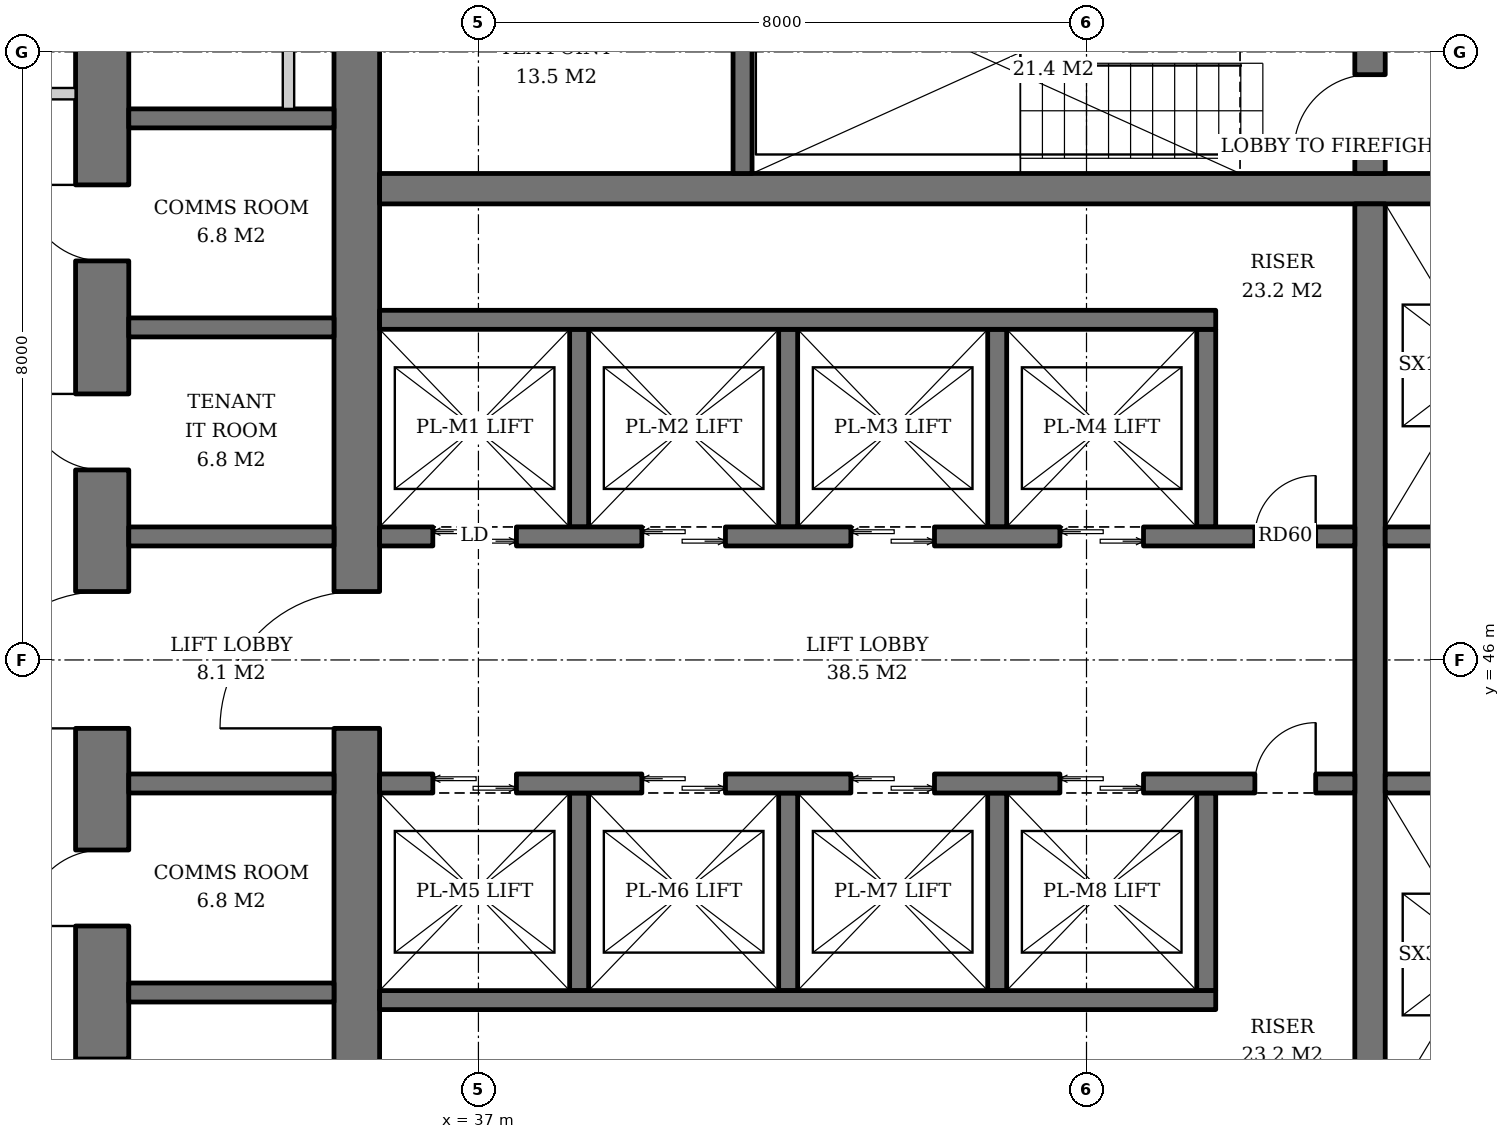
"""IFC4 building model, lengths in metres.
Left out: names, types, materials, properties, quantities, classifications, styles, units other than length and angle.
Written with IfcOpenShell. Run it as: python <this file> out.ifc"""

import sys

from ifc_helpers import new_model, si_unit, direction, frame, frame_2d, origin, place, context, subcontext, project, spatial, rectangle, extrude, element, fill, save


model = new_model("IFC4")
c1 = context("Model", 3, precision=1e-05, world=origin(), true_north=direction((0.0, 1.0)))
c2 = subcontext(c1, "Body", "Model", "MODEL_VIEW")
j1 = project(units=[si_unit("LENGTHUNIT", "METRE"), si_unit("PLANEANGLEUNIT", "RADIAN")], contexts=[c1])
p1 = place(None, origin())
s1 = spatial("IfcSite", under=j1, at=p1, CompositionType="ELEMENT")
p2 = place(p1, origin())
s2 = spatial("IfcBuilding", under=s1, at=p2, CompositionType="ELEMENT")
p3 = place(p2, frame((0.0, 0.0, 146.4)))
s3 = spatial("IfcBuildingStorey", under=s2, at=p3, CompositionType="ELEMENT", Elevation=146.4)
p4 = place(p3, frame((35.4, 36.7, 0.0), z_axis=(0.0, 0.0, 1.0), x_axis=(0.0, 1.0, 0.0)))
e1 = element("IfcWall", 1, at=p4, inside=s3, PredefinedType="SHEAR", context=c2, shape_type="SweptSolid", body=[
    extrude(rectangle(XDim=18.6, YDim=0.6, at=frame_2d((9.3, 0.0))), origin(), (0.0, 0.0, 1.0), 3.8),
])
p5 = place(p4, frame((8.4, 0.0, 0.0)))
e2 = element("IfcOpeningElement", 2, at=p5, cuts=e1, PredefinedType="OPENING", context=c2, shape_type="SweptSolid", body=[
    extrude(rectangle(XDim=1.8, YDim=2.4, at=frame_2d((0.9, 1.2))), frame((0.0, 0.31, 0.0), z_axis=(0.0, -1.0, 0.0), x_axis=(1.0, 0.0, 0.0)), (0.0, 0.0, 1.0), 0.62),
])
p6 = place(p3, frame((32.05, 33.4, 0.0), z_axis=(0.0, 0.0, 1.0), x_axis=(0.0, 1.0, 0.0)))
e3 = element("IfcWall", 3, at=p6, inside=s3, PredefinedType="SHEAR", context=c2, shape_type="SweptSolid", body=[
    extrude(rectangle(XDim=25.2, YDim=0.7, at=frame_2d((12.6, 0.0))), origin(), (0.0, 0.0, 1.0), 3.8),
])
p7 = place(p6, frame((11.7, 0.0, 0.0)))
e4 = element("IfcOpeningElement", 4, at=p7, cuts=e3, PredefinedType="OPENING", context=c2, shape_type="SweptSolid", body=[
    extrude(rectangle(XDim=1.8, YDim=2.4, at=frame_2d((0.9, 1.2))), frame((0.0, 0.36, 0.0), z_axis=(0.0, -1.0, 0.0), x_axis=(1.0, 0.0, 0.0)), (0.0, 0.0, 1.0), 0.72),
])
p8 = place(p6, frame((3.6, 0.0, 0.0)))
e5 = element("IfcOpeningElement", 5, at=p8, cuts=e3, PredefinedType="OPENING", context=c2, shape_type="SweptSolid", body=[
    extrude(rectangle(XDim=1.0, YDim=2.1, at=frame_2d((0.5, 1.05))), frame((0.0, 0.36, 0.0), z_axis=(0.0, -1.0, 0.0), x_axis=(1.0, 0.0, 0.0)), (0.0, 0.0, 1.0), 0.72),
])
p9 = place(p6, frame((6.35, 0.0, 0.0)))
e6 = element("IfcOpeningElement", 6, at=p9, cuts=e3, PredefinedType="OPENING", context=c2, shape_type="SweptSolid", body=[
    extrude(rectangle(XDim=1.0, YDim=2.1, at=frame_2d((0.5, 1.05))), frame((0.0, 0.36, 0.0), z_axis=(0.0, -1.0, 0.0), x_axis=(1.0, 0.0, 0.0)), (0.0, 0.0, 1.0), 0.72),
])
p10 = place(p6, frame((9.1, 0.0, 0.0)))
e7 = element("IfcOpeningElement", 7, at=p10, cuts=e3, PredefinedType="OPENING", context=c2, shape_type="SweptSolid", body=[
    extrude(rectangle(XDim=1.0, YDim=2.1, at=frame_2d((0.5, 1.05))), frame((0.0, 0.36, 0.0), z_axis=(0.0, -1.0, 0.0), x_axis=(1.0, 0.0, 0.0)), (0.0, 0.0, 1.0), 0.72),
])
p11 = place(p6, frame((15.1, 0.0, 0.0)))
e8 = element("IfcOpeningElement", 8, at=p11, cuts=e3, PredefinedType="OPENING", context=c2, shape_type="SweptSolid", body=[
    extrude(rectangle(XDim=1.0, YDim=2.1, at=frame_2d((0.5, 1.05))), frame((0.0, 0.36, 0.0), z_axis=(0.0, -1.0, 0.0), x_axis=(1.0, 0.0, 0.0)), (0.0, 0.0, 1.0), 0.72),
])
p12 = place(p6, frame((17.85, 0.0, 0.0)))
e9 = element("IfcOpeningElement", 9, at=p12, cuts=e3, PredefinedType="OPENING", context=c2, shape_type="SweptSolid", body=[
    extrude(rectangle(XDim=1.0, YDim=2.1, at=frame_2d((0.5, 1.05))), frame((0.0, 0.36, 0.0), z_axis=(0.0, -1.0, 0.0), x_axis=(1.0, 0.0, 0.0)), (0.0, 0.0, 1.0), 0.72),
])
p13 = place(p3, frame((35.7, 52.2, 0.0), z_axis=(0.0, 0.0, 1.0), x_axis=(1.0, 0.0, 0.0)))
e10 = element("IfcWall", 10, at=p13, inside=s3, PredefinedType="SHEAR", context=c2, shape_type="SweptSolid", body=[
    extrude(rectangle(XDim=18.6, YDim=0.4, at=frame_2d((9.3, 0.0))), origin(), (0.0, 0.0, 1.0), 3.8),
])
p14 = place(p3, frame((48.73, 40.0, 0.0), z_axis=(0.0, 0.0, 1.0), x_axis=(0.0, 1.0, 0.0)))
e11 = element("IfcWall", 11, at=p14, inside=s3, PredefinedType="SHEAR", context=c2, shape_type="SweptSolid", body=[
    extrude(rectangle(XDim=12.0, YDim=0.4, at=frame_2d((6.0, 0.0))), origin(), (0.0, 0.0, 1.0), 3.8),
])
p15 = place(p3, frame((48.73, 52.4, 0.0), z_axis=(0.0, 0.0, 1.0), x_axis=(0.0, 1.0, 0.0)))
e12 = element("IfcWall", 12, at=p15, inside=s3, PredefinedType="SHEAR", context=c2, shape_type="SweptSolid", body=[
    extrude(rectangle(XDim=2.9, YDim=0.4, at=frame_2d((1.45, 0.0))), origin(), (0.0, 0.0, 1.0), 3.8),
])
p16 = place(p15, frame((0.3, 0.0, 0.0)))
e13 = element("IfcOpeningElement", 13, at=p16, cuts=e12, PredefinedType="OPENING", context=c2, shape_type="SweptSolid", body=[
    extrude(rectangle(XDim=1.0, YDim=2.1, at=frame_2d((0.5, 1.05))), frame((0.0, 0.21, 0.0), z_axis=(0.0, -1.0, 0.0), x_axis=(1.0, 0.0, 0.0)), (0.0, 0.0, 1.0), 0.42),
])
p17 = place(p3, frame((40.475, 52.4, 0.0), z_axis=(0.0, 0.0, 1.0), x_axis=(0.0, 1.0, 0.0)))
e14 = element("IfcWall", 14, at=p17, inside=s3, PredefinedType="SHEAR", context=c2, shape_type="SweptSolid", body=[
    extrude(rectangle(XDim=2.9, YDim=0.25, at=frame_2d((1.45, 0.0))), origin(), (0.0, 0.0, 1.0), 3.8),
])
for number, where, z_axis, x_axis in (
    (15, (38.325, 47.75, 0.0), (0.0, 0.0, 1.0), (0.0, 1.0, 0.0)),
    (16, (41.075, 47.75, 0.0), (0.0, 0.0, 1.0), (0.0, 1.0, 0.0)),
    (17, (43.825, 47.75, 0.0), (0.0, 0.0, 1.0), (0.0, 1.0, 0.0)),
    (18, (46.575, 47.75, 0.0), (0.0, 0.0, 1.0), (0.0, 1.0, 0.0)),
):
    element("IfcWall", number, at=place(p3, frame(where, z_axis=z_axis, x_axis=x_axis)), inside=s3, PredefinedType="SHEAR", context=c2, shape_type="SweptSolid", body=[
        extrude(rectangle(XDim=2.6, YDim=0.25, at=frame_2d((1.3, 0.0))), origin(), (0.0, 0.0, 1.0), 3.8),
    ])
p18 = place(p3, frame((35.7, 50.475, 0.0), z_axis=(0.0, 0.0, 1.0), x_axis=(1.0, 0.0, 0.0)))
e19 = element("IfcWall", 19, at=p18, inside=s3, PredefinedType="SHEAR", context=c2, shape_type="SweptSolid", body=[
    extrude(rectangle(XDim=11.0, YDim=0.25, at=frame_2d((5.5, 0.0))), origin(), (0.0, 0.0, 1.0), 3.8),
])
p19 = place(p3, frame((35.7, 47.625, 0.0), z_axis=(0.0, 0.0, 1.0), x_axis=(1.0, 0.0, 0.0)))
e20 = element("IfcWall", 20, at=p19, inside=s3, PredefinedType="SHEAR", context=c2, shape_type="SweptSolid", body=[
    extrude(rectangle(XDim=12.83, YDim=0.25, at=frame_2d((6.415, 0.0))), origin(), (0.0, 0.0, 1.0), 3.8),
])
p20 = place(p19, frame((0.7, 0.0, 0.0)))
e21 = element("IfcOpeningElement", 21, at=p20, cuts=e20, PredefinedType="OPENING", context=c2, shape_type="SweptSolid", body=[
    extrude(rectangle(XDim=1.1, YDim=2.2, at=frame_2d((0.55, 1.1))), frame((0.0, 0.135, 0.0), z_axis=(0.0, -1.0, 0.0), x_axis=(1.0, 0.0, 0.0)), (0.0, 0.0, 1.0), 0.27),
])
p21 = place(p19, frame((3.45, 0.0, 0.0)))
e22 = element("IfcOpeningElement", 22, at=p21, cuts=e20, PredefinedType="OPENING", context=c2, shape_type="SweptSolid", body=[
    extrude(rectangle(XDim=1.1, YDim=2.2, at=frame_2d((0.55, 1.1))), frame((0.0, 0.135, 0.0), z_axis=(0.0, -1.0, 0.0), x_axis=(1.0, 0.0, 0.0)), (0.0, 0.0, 1.0), 0.27),
])
p22 = place(p19, frame((6.2, 0.0, 0.0)))
e23 = element("IfcOpeningElement", 23, at=p22, cuts=e20, PredefinedType="OPENING", context=c2, shape_type="SweptSolid", body=[
    extrude(rectangle(XDim=1.1, YDim=2.2, at=frame_2d((0.55, 1.1))), frame((0.0, 0.135, 0.0), z_axis=(0.0, -1.0, 0.0), x_axis=(1.0, 0.0, 0.0)), (0.0, 0.0, 1.0), 0.27),
])
p23 = place(p19, frame((8.95, 0.0, 0.0)))
e24 = element("IfcOpeningElement", 24, at=p23, cuts=e20, PredefinedType="OPENING", context=c2, shape_type="SweptSolid", body=[
    extrude(rectangle(XDim=1.1, YDim=2.2, at=frame_2d((0.55, 1.1))), frame((0.0, 0.135, 0.0), z_axis=(0.0, -1.0, 0.0), x_axis=(1.0, 0.0, 0.0)), (0.0, 0.0, 1.0), 0.27),
])
p24 = place(p19, frame((11.515, 0.0, 0.0)))
e25 = element("IfcOpeningElement", 25, at=p24, cuts=e20, PredefinedType="OPENING", context=c2, shape_type="SweptSolid", body=[
    extrude(rectangle(XDim=0.8, YDim=2.0, at=frame_2d((0.4, 1.0))), frame((0.0, 0.135, 0.0), z_axis=(0.0, -1.0, 0.0), x_axis=(1.0, 0.0, 0.0)), (0.0, 0.0, 1.0), 0.27),
])
for number, where, z_axis, x_axis in (
    (26, (38.325, 44.25, 0.0), (0.0, 0.0, 1.0), (0.0, -1.0, 0.0)),
    (27, (41.075, 44.25, 0.0), (0.0, 0.0, 1.0), (0.0, -1.0, 0.0)),
    (28, (43.825, 44.25, 0.0), (0.0, 0.0, 1.0), (0.0, -1.0, 0.0)),
    (29, (46.575, 44.25, 0.0), (0.0, 0.0, 1.0), (0.0, -1.0, 0.0)),
):
    element("IfcWall", number, at=place(p3, frame(where, z_axis=z_axis, x_axis=x_axis)), inside=s3, PredefinedType="SHEAR", context=c2, shape_type="SweptSolid", body=[
        extrude(rectangle(XDim=2.6, YDim=0.25, at=frame_2d((1.3, 0.0))), origin(), (0.0, 0.0, 1.0), 3.8),
    ])
p25 = place(p3, frame((35.7, 41.525, 0.0), z_axis=(0.0, 0.0, 1.0), x_axis=(1.0, 0.0, 0.0)))
e30 = element("IfcWall", 30, at=p25, inside=s3, PredefinedType="SHEAR", context=c2, shape_type="SweptSolid", body=[
    extrude(rectangle(XDim=11.0, YDim=0.25, at=frame_2d((5.5, 0.0))), origin(), (0.0, 0.0, 1.0), 3.8),
])
p26 = place(p3, frame((35.7, 44.375, 0.0), z_axis=(0.0, 0.0, 1.0), x_axis=(1.0, 0.0, 0.0)))
e31 = element("IfcWall", 31, at=p26, inside=s3, PredefinedType="SHEAR", context=c2, shape_type="SweptSolid", body=[
    extrude(rectangle(XDim=12.83, YDim=0.25, at=frame_2d((6.415, 0.0))), origin(), (0.0, 0.0, 1.0), 3.8),
])
p27 = place(p26, frame((0.7, 0.0, 0.0)))
e32 = element("IfcOpeningElement", 32, at=p27, cuts=e31, PredefinedType="OPENING", context=c2, shape_type="SweptSolid", body=[
    extrude(rectangle(XDim=1.1, YDim=2.2, at=frame_2d((0.55, 1.1))), frame((0.0, 0.135, 0.0), z_axis=(0.0, -1.0, 0.0), x_axis=(1.0, 0.0, 0.0)), (0.0, 0.0, 1.0), 0.27),
])
p28 = place(p26, frame((3.45, 0.0, 0.0)))
e33 = element("IfcOpeningElement", 33, at=p28, cuts=e31, PredefinedType="OPENING", context=c2, shape_type="SweptSolid", body=[
    extrude(rectangle(XDim=1.1, YDim=2.2, at=frame_2d((0.55, 1.1))), frame((0.0, 0.135, 0.0), z_axis=(0.0, -1.0, 0.0), x_axis=(1.0, 0.0, 0.0)), (0.0, 0.0, 1.0), 0.27),
])
p29 = place(p26, frame((6.2, 0.0, 0.0)))
e34 = element("IfcOpeningElement", 34, at=p29, cuts=e31, PredefinedType="OPENING", context=c2, shape_type="SweptSolid", body=[
    extrude(rectangle(XDim=1.1, YDim=2.2, at=frame_2d((0.55, 1.1))), frame((0.0, 0.135, 0.0), z_axis=(0.0, -1.0, 0.0), x_axis=(1.0, 0.0, 0.0)), (0.0, 0.0, 1.0), 0.27),
])
p30 = place(p26, frame((8.95, 0.0, 0.0)))
e35 = element("IfcOpeningElement", 35, at=p30, cuts=e31, PredefinedType="OPENING", context=c2, shape_type="SweptSolid", body=[
    extrude(rectangle(XDim=1.1, YDim=2.2, at=frame_2d((0.55, 1.1))), frame((0.0, 0.135, 0.0), z_axis=(0.0, -1.0, 0.0), x_axis=(1.0, 0.0, 0.0)), (0.0, 0.0, 1.0), 0.27),
])
p31 = place(p26, frame((11.515, 0.0, 0.0)))
e36 = element("IfcOpeningElement", 36, at=p31, cuts=e31, PredefinedType="OPENING", context=c2, shape_type="SweptSolid", body=[
    extrude(rectangle(XDim=0.8, YDim=2.0, at=frame_2d((0.4, 1.0))), frame((0.0, 0.135, 0.0), z_axis=(0.0, -1.0, 0.0), x_axis=(1.0, 0.0, 0.0)), (0.0, 0.0, 1.0), 0.27),
])
for number, where, z_axis, x_axis in (
    (37, (48.93, 47.625, 0.0), (0.0, 0.0, 1.0), (1.0, 0.0, 0.0)),
    (38, (48.93, 44.375, 0.0), (0.0, 0.0, 1.0), (1.0, 0.0, 0.0)),
):
    element("IfcWall", number, at=place(p3, frame(where, z_axis=z_axis, x_axis=x_axis)), inside=s3, PredefinedType="SHEAR", context=c2, shape_type="SweptSolid", body=[
        extrude(rectangle(XDim=5.37, YDim=0.25, at=frame_2d((2.685, 0.0))), origin(), (0.0, 0.0, 1.0), 3.8),
    ])
for number, where, z_axis, x_axis in (
    (39, (32.4, 41.625, 0.0), (0.0, 0.0, 1.0), (1.0, 0.0, 0.0)),
    (40, (32.4, 44.375, 0.0), (0.0, 0.0, 1.0), (1.0, 0.0, 0.0)),
    (41, (32.4, 47.625, 0.0), (0.0, 0.0, 1.0), (1.0, 0.0, 0.0)),
    (42, (32.4, 50.375, 0.0), (0.0, 0.0, 1.0), (1.0, 0.0, 0.0)),
    (43, (32.4, 53.125, 0.0), (0.0, 0.0, 1.0), (1.0, 0.0, 0.0)),
):
    element("IfcWall", number, at=place(p3, frame(where, z_axis=z_axis, x_axis=x_axis)), inside=s3, PredefinedType="SHEAR", context=c2, shape_type="SweptSolid", body=[
        extrude(rectangle(XDim=2.7, YDim=0.25, at=frame_2d((1.35, 0.0))), origin(), (0.0, 0.0, 1.0), 3.8),
    ])
p32 = place(p3, frame((34.501, 53.25, 0.0), z_axis=(0.0, 0.0, 1.0), x_axis=(0.0, 1.0, 0.0)))
e44 = element("IfcWall", 44, at=p32, inside=s3, PredefinedType="SOLIDWALL", context=c2, shape_type="SweptSolid", body=[
    extrude(rectangle(XDim=5.35, YDim=0.15, at=frame_2d((2.675, 0.0))), origin(), (0.0, 0.0, 1.0), 3.62),
])
p33 = place(p3, frame((31.7, 53.45, 0.0), z_axis=(0.0, 0.0, 1.0), x_axis=(-1.0, 0.0, 0.0)))
e45 = element("IfcWall", 45, at=p33, inside=s3, PredefinedType="PARTITIONING", context=c2, shape_type="SweptSolid", body=[
    extrude(rectangle(XDim=1.725, YDim=0.15, at=frame_2d((0.862, 0.0))), origin(), (0.0, 0.0, 1.0), 3.62),
])
p34 = place(p20, origin())
e46 = element("IfcDoor", 46, at=p34, inside=s3, OperationType="DOUBLE_DOOR_SLIDING", PredefinedType="DOOR", context=c2, shape_type="SweptSolid", body=[
    extrude(rectangle(XDim=1.1, YDim=2.2, at=frame_2d((0.55, 1.1))), frame((0.0, 0.025, 0.0), z_axis=(0.0, -1.0, 0.0), x_axis=(1.0, 0.0, 0.0)), (0.0, 0.0, 1.0), 0.05),
])
fill(e21, e46)
p35 = place(p21, origin())
e47 = element("IfcDoor", 47, at=p35, inside=s3, OperationType="DOUBLE_DOOR_SLIDING", PredefinedType="DOOR", context=c2, shape_type="SweptSolid", body=[
    extrude(rectangle(XDim=1.1, YDim=2.2, at=frame_2d((0.55, 1.1))), frame((0.0, 0.025, 0.0), z_axis=(0.0, -1.0, 0.0), x_axis=(1.0, 0.0, 0.0)), (0.0, 0.0, 1.0), 0.05),
])
fill(e22, e47)
p36 = place(p22, origin())
e48 = element("IfcDoor", 48, at=p36, inside=s3, OperationType="DOUBLE_DOOR_SLIDING", PredefinedType="DOOR", context=c2, shape_type="SweptSolid", body=[
    extrude(rectangle(XDim=1.1, YDim=2.2, at=frame_2d((0.55, 1.1))), frame((0.0, 0.025, 0.0), z_axis=(0.0, -1.0, 0.0), x_axis=(1.0, 0.0, 0.0)), (0.0, 0.0, 1.0), 0.05),
])
fill(e23, e48)
p37 = place(p23, origin())
e49 = element("IfcDoor", 49, at=p37, inside=s3, OperationType="DOUBLE_DOOR_SLIDING", PredefinedType="DOOR", context=c2, shape_type="SweptSolid", body=[
    extrude(rectangle(XDim=1.1, YDim=2.2, at=frame_2d((0.55, 1.1))), frame((0.0, 0.025, 0.0), z_axis=(0.0, -1.0, 0.0), x_axis=(1.0, 0.0, 0.0)), (0.0, 0.0, 1.0), 0.05),
])
fill(e24, e49)
p38 = place(p24, origin())
e50 = element("IfcDoor", 50, at=p38, inside=s3, OperationType="SINGLE_SWING_RIGHT", PredefinedType="DOOR", context=c2, shape_type="SweptSolid", body=[
    extrude(rectangle(XDim=0.8, YDim=2.0, at=frame_2d((0.4, 1.0))), frame((0.0, 0.025, 0.0), z_axis=(0.0, -1.0, 0.0), x_axis=(1.0, 0.0, 0.0)), (0.0, 0.0, 1.0), 0.05),
])
fill(e25, e50)
p39 = place(p27, origin())
e51 = element("IfcDoor", 51, at=p39, inside=s3, OperationType="DOUBLE_DOOR_SLIDING", PredefinedType="DOOR", context=c2, shape_type="SweptSolid", body=[
    extrude(rectangle(XDim=1.1, YDim=2.2, at=frame_2d((0.55, 1.1))), frame((0.0, 0.025, 0.0), z_axis=(0.0, -1.0, 0.0), x_axis=(1.0, 0.0, 0.0)), (0.0, 0.0, 1.0), 0.05),
])
fill(e32, e51)
p40 = place(p28, origin())
e52 = element("IfcDoor", 52, at=p40, inside=s3, OperationType="DOUBLE_DOOR_SLIDING", PredefinedType="DOOR", context=c2, shape_type="SweptSolid", body=[
    extrude(rectangle(XDim=1.1, YDim=2.2, at=frame_2d((0.55, 1.1))), frame((0.0, 0.025, 0.0), z_axis=(0.0, -1.0, 0.0), x_axis=(1.0, 0.0, 0.0)), (0.0, 0.0, 1.0), 0.05),
])
fill(e33, e52)
p41 = place(p29, origin())
e53 = element("IfcDoor", 53, at=p41, inside=s3, OperationType="DOUBLE_DOOR_SLIDING", PredefinedType="DOOR", context=c2, shape_type="SweptSolid", body=[
    extrude(rectangle(XDim=1.1, YDim=2.2, at=frame_2d((0.55, 1.1))), frame((0.0, 0.025, 0.0), z_axis=(0.0, -1.0, 0.0), x_axis=(1.0, 0.0, 0.0)), (0.0, 0.0, 1.0), 0.05),
])
fill(e34, e53)
p42 = place(p30, origin())
e54 = element("IfcDoor", 54, at=p42, inside=s3, OperationType="DOUBLE_DOOR_SLIDING", PredefinedType="DOOR", context=c2, shape_type="SweptSolid", body=[
    extrude(rectangle(XDim=1.1, YDim=2.2, at=frame_2d((0.55, 1.1))), frame((0.0, 0.025, 0.0), z_axis=(0.0, -1.0, 0.0), x_axis=(1.0, 0.0, 0.0)), (0.0, 0.0, 1.0), 0.05),
])
fill(e35, e54)
p43 = place(p31, origin())
e55 = element("IfcDoor", 55, at=p43, inside=s3, OperationType="SINGLE_SWING_RIGHT", PredefinedType="DOOR", context=c2, shape_type="SweptSolid", body=[
    extrude(rectangle(XDim=0.8, YDim=2.0, at=frame_2d((0.4, 1.0))), frame((0.0, 0.025, 0.0), z_axis=(0.0, -1.0, 0.0), x_axis=(1.0, 0.0, 0.0)), (0.0, 0.0, 1.0), 0.05),
])
fill(e36, e55)
p44 = place(p16, origin())
e56 = element("IfcDoor", 56, at=p44, inside=s3, OperationType="SINGLE_SWING_LEFT", PredefinedType="DOOR", context=c2, shape_type="SweptSolid", body=[
    extrude(rectangle(XDim=1.0, YDim=2.1, at=frame_2d((0.5, 1.05))), frame((0.0, 0.025, 0.0), z_axis=(0.0, -1.0, 0.0), x_axis=(1.0, 0.0, 0.0)), (0.0, 0.0, 1.0), 0.05),
])
fill(e13, e56)
p45 = place(p5, origin())
e57 = element("IfcDoor", 57, at=p45, inside=s3, OperationType="DOUBLE_DOOR_SINGLE_SWING", PredefinedType="DOOR", context=c2, shape_type="SweptSolid", body=[
    extrude(rectangle(XDim=1.8, YDim=2.4, at=frame_2d((0.9, 1.2))), frame((0.0, 0.025, 0.0), z_axis=(0.0, -1.0, 0.0), x_axis=(1.0, 0.0, 0.0)), (0.0, 0.0, 1.0), 0.05),
])
fill(e2, e57)
p46 = place(p7, origin())
e58 = element("IfcDoor", 58, at=p46, inside=s3, OperationType="DOUBLE_DOOR_SINGLE_SWING", PredefinedType="DOOR", context=c2, shape_type="SweptSolid", body=[
    extrude(rectangle(XDim=1.8, YDim=2.4, at=frame_2d((0.9, 1.2))), frame((0.0, 0.025, 0.0), z_axis=(0.0, -1.0, 0.0), x_axis=(1.0, 0.0, 0.0)), (0.0, 0.0, 1.0), 0.05),
])
fill(e4, e58)
p47 = place(p10, origin())
e59 = element("IfcDoor", 59, at=p47, inside=s3, OperationType="SINGLE_SWING_LEFT", PredefinedType="DOOR", context=c2, shape_type="SweptSolid", body=[
    extrude(rectangle(XDim=1.0, YDim=2.1, at=frame_2d((0.5, 1.05))), frame((0.0, -0.29, 0.0), z_axis=(0.0, -1.0, 0.0), x_axis=(1.0, 0.0, 0.0)), (0.0, 0.0, 1.0), 0.05),
])
fill(e7, e59)
p48 = place(p11, origin())
e60 = element("IfcDoor", 60, at=p48, inside=s3, OperationType="SINGLE_SWING_RIGHT", PredefinedType="DOOR", context=c2, shape_type="SweptSolid", body=[
    extrude(rectangle(XDim=1.0, YDim=2.1, at=frame_2d((0.5, 1.05))), frame((0.0, -0.29, 0.0), z_axis=(0.0, -1.0, 0.0), x_axis=(1.0, 0.0, 0.0)), (0.0, 0.0, 1.0), 0.05),
])
fill(e8, e60)
p49 = place(p12, origin())
e61 = element("IfcDoor", 61, at=p49, inside=s3, OperationType="SINGLE_SWING_RIGHT", PredefinedType="DOOR", context=c2, shape_type="SweptSolid", body=[
    extrude(rectangle(XDim=1.0, YDim=2.1, at=frame_2d((0.5, 1.05))), frame((0.0, -0.29, 0.0), z_axis=(0.0, -1.0, 0.0), x_axis=(1.0, 0.0, 0.0)), (0.0, 0.0, 1.0), 0.05),
])
fill(e9, e61)
save(model, sys.argv[1])
